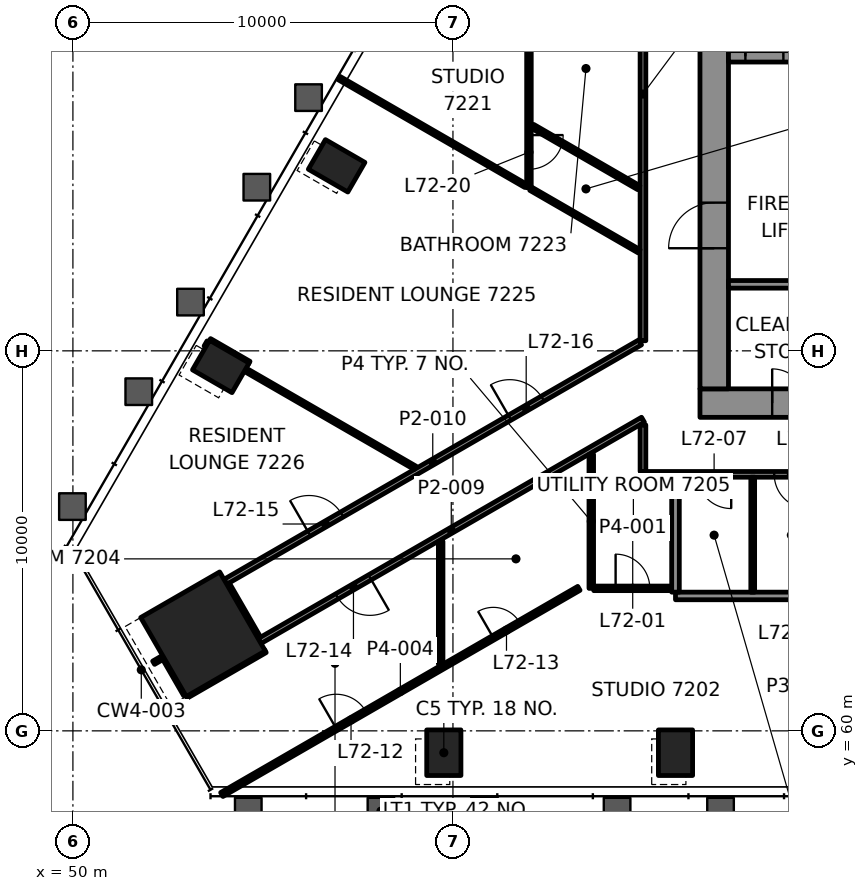
"""IFC4 building model, lengths in metres.
Left out: names, types, materials, properties, quantities, classifications, styles, units other than length and angle.
Written with IfcOpenShell. Run it as: python <this file> out.ifc"""

import sys

from ifc_helpers import new_model, si_unit, direction, frame, frame_2d, origin, origin_2d, place, context, subcontext, project, spatial, rectangle, hollow_rectangle, extrude, element, fill, save


model = new_model("IFC4")
c1 = context("Model", 3, precision=1e-05, world=origin(), true_north=direction((0.0, 1.0)))
c2 = subcontext(c1, "Body", "Model", "MODEL_VIEW")
j1 = project(units=[si_unit("LENGTHUNIT", "METRE"), si_unit("PLANEANGLEUNIT", "RADIAN")], contexts=[c1])
p1 = place(None, origin())
s1 = spatial("IfcSite", under=j1, at=p1, CompositionType="ELEMENT")
p2 = place(p1, origin())
s2 = spatial("IfcBuilding", under=s1, at=p2, CompositionType="ELEMENT")
p3 = place(p2, frame((0.0, 0.0, 298.6)))
s3 = spatial("IfcBuildingStorey", under=s2, at=p3, CompositionType="ELEMENT", Elevation=298.6)
p4 = place(p3, frame((53.423, 62.542, 0.0), z_axis=(0.0, 0.0, 1.0), x_axis=(0.5, -0.866025403784, 0.0)))
e1 = element("IfcColumn", 1, at=p4, inside=s3, PredefinedType="COLUMN", context=c2, shape_type="SweptSolid", body=[
    extrude(rectangle(XDim=2.4, YDim=2.4, at=origin_2d()), origin(), (0.0, 0.0, 1.0), 3.5),
])
for number, where, z_axis, x_axis in (
    (2, (59.76, 59.425, -0.0), (0.0, 0.0, 1.0), (1.0, 0.0, 0.0)),
    (3, (65.856, 59.425, -0.0), (0.0, 0.0, 1.0), (1.0, 0.0, 0.0)),
    (4, (56.939, 74.869, -0.0), (0.0, 0.0, 1.0), (-0.5, -0.866, 0.0)),
    (5, (53.891, 69.589, -0.0), (0.0, 0.0, 1.0), (-0.5, -0.866, 0.0)),
):
    element("IfcColumn", number, at=place(p3, frame(where, z_axis=z_axis, x_axis=x_axis)), inside=s3, PredefinedType="COLUMN", context=c2, shape_type="SweptSolid", body=[
        extrude(hollow_rectangle(XDim=0.9, YDim=1.2, WallThickness=0.06, at=origin_2d()), origin(), (0.0, 0.0, 1.0), 3.5),
    ])
p5 = place(p3, frame((66.5, 68.625, 0.0), z_axis=(0.0, 0.0, 1.0), x_axis=(1.0, 0.0, 0.0)))
e6 = element("IfcWall", 6, at=p5, inside=s3, PredefinedType="SHEAR", context=c2, shape_type="SweptSolid", body=[
    extrude(rectangle(XDim=17.0, YDim=0.75, at=frame_2d((8.5, 0.0))), origin(), (0.0, 0.0, 1.0), 3.3),
])
p6 = place(p5, frame((1.9, 0.0, 0.0)))
e7 = element("IfcOpeningElement", 7, at=p6, cuts=e6, PredefinedType="OPENING", context=c2, shape_type="SweptSolid", body=[
    extrude(rectangle(XDim=0.9, YDim=2.1, at=frame_2d((0.45, 1.05))), frame((0.0, 0.385, 0.0), z_axis=(0.0, -1.0, 0.0), x_axis=(1.0, 0.0, 0.0)), (0.0, 0.0, 1.0), 0.77),
])
p7 = place(p3, frame((66.875, 69.0, 0.0), z_axis=(0.0, 0.0, 1.0), x_axis=(0.0, 1.0, 0.0)))
e8 = element("IfcWall", 8, at=p7, inside=s3, PredefinedType="SHEAR", context=c2, shape_type="SweptSolid", body=[
    extrude(rectangle(XDim=12.0, YDim=0.75, at=frame_2d((6.0, 0.0))), origin(), (0.0, 0.0, 1.0), 3.3),
])
p8 = place(p7, frame((3.7, 0.0, 0.0)))
e9 = element("IfcOpeningElement", 9, at=p8, cuts=e8, PredefinedType="OPENING", context=c2, shape_type="SweptSolid", body=[
    extrude(rectangle(XDim=1.2, YDim=2.1, at=frame_2d((0.6, 1.05))), frame((0.0, 0.385, 0.0), z_axis=(0.0, -1.0, 0.0), x_axis=(1.0, 0.0, 0.0)), (0.0, 0.0, 1.0), 0.77),
])
p9 = place(p3, frame((67.25, 77.75, 0.0), z_axis=(0.0, 0.0, 1.0), x_axis=(1.0, 0.0, 0.0)))
e10 = element("IfcWall", 10, at=p9, inside=s3, PredefinedType="SHEAR", context=c2, shape_type="SweptSolid", body=[
    extrude(rectangle(XDim=15.5, YDim=0.3, at=frame_2d((7.75, 0.0))), origin(), (0.0, 0.0, 1.0), 3.3),
])
p10 = place(p9, frame((0.445, 0.0, 0.0)))
e11 = element("IfcOpeningElement", 11, at=p10, cuts=e10, PredefinedType="OPENING", context=c2, shape_type="SweptSolid", body=[
    extrude(rectangle(XDim=1.0, YDim=2.1, at=frame_2d((0.5, 1.05))), frame((0.0, 0.16, 0.0), z_axis=(0.0, -1.0, 0.0), x_axis=(1.0, 0.0, 0.0)), (0.0, 0.0, 1.0), 0.32),
])
p11 = place(p3, frame((65.856, 63.55, 0.0), z_axis=(0.0, 0.0, 1.0), x_axis=(1.0, 0.0, 0.0)))
e12 = element("IfcWall", 12, at=p11, inside=s3, PredefinedType="PARTITIONING", context=c2, shape_type="SweptSolid", body=[
    extrude(rectangle(XDim=8.128, YDim=0.2, at=frame_2d((4.064, 0.0))), origin(), (0.0, 0.0, 1.0), 2.7),
])
p12 = place(p3, frame((63.704, 63.75, 0.0), z_axis=(0.0, 0.0, 1.0), x_axis=(1.0, 0.0, 0.0)))
e13 = element("IfcWall", 13, at=p12, inside=s3, PredefinedType="PARTITIONING", context=c2, shape_type="SweptSolid", body=[
    extrude(rectangle(XDim=2.052, YDim=0.12, at=frame_2d((1.026, 0.0))), origin(), (0.0, 0.0, 1.0), 2.7),
])
p13 = place(p12, frame((0.576, 0.0, 0.0)))
e14 = element("IfcOpeningElement", 14, at=p13, cuts=e13, PredefinedType="OPENING", context=c2, shape_type="SweptSolid", body=[
    extrude(rectangle(XDim=0.9, YDim=2.1, at=frame_2d((0.45, 1.05))), frame((0.0, 0.07, 0.0), z_axis=(0.0, -1.0, 0.0), x_axis=(1.0, 0.0, 0.0)), (0.0, 0.0, 1.0), 0.14),
])
p14 = place(p3, frame((85.0, 66.75, 0.0), z_axis=(0.0, 0.0, 1.0), x_axis=(-1.0, 0.0, 0.0)))
e15 = element("IfcWall", 15, at=p14, inside=s3, PredefinedType="PARTITIONING", context=c2, shape_type="SweptSolid", body=[
    extrude(rectangle(XDim=20.0, YDim=0.15, at=frame_2d((10.0, 0.0))), origin(), (0.0, 0.0, 1.0), 2.7),
])
p15 = place(p14, frame((5.486, 0.0, 0.0)))
e16 = element("IfcOpeningElement", 16, at=p15, cuts=e15, PredefinedType="OPENING", context=c2, shape_type="SweptSolid", body=[
    extrude(rectangle(XDim=0.9, YDim=2.1, at=frame_2d((0.45, 1.05))), frame((0.0, 0.085, 0.0), z_axis=(0.0, -1.0, 0.0), x_axis=(1.0, 0.0, 0.0)), (0.0, 0.0, 1.0), 0.17),
])
p16 = place(p14, frame((11.582, 0.0, 0.0)))
e17 = element("IfcOpeningElement", 17, at=p16, cuts=e15, PredefinedType="OPENING", context=c2, shape_type="SweptSolid", body=[
    extrude(rectangle(XDim=0.9, YDim=2.1, at=frame_2d((0.45, 1.05))), frame((0.0, 0.085, 0.0), z_axis=(0.0, -1.0, 0.0), x_axis=(1.0, 0.0, 0.0)), (0.0, 0.0, 1.0), 0.17),
])
p17 = place(p14, frame((13.614, 0.0, 0.0)))
e18 = element("IfcOpeningElement", 18, at=p17, cuts=e15, PredefinedType="OPENING", context=c2, shape_type="SweptSolid", body=[
    extrude(rectangle(XDim=0.9, YDim=2.1, at=frame_2d((0.45, 1.05))), frame((0.0, 0.085, 0.0), z_axis=(0.0, -1.0, 0.0), x_axis=(1.0, 0.0, 0.0)), (0.0, 0.0, 1.0), 0.17),
])
p18 = place(p14, frame((15.646, 0.0, 0.0)))
e19 = element("IfcOpeningElement", 19, at=p18, cuts=e15, PredefinedType="OPENING", context=c2, shape_type="SweptSolid", body=[
    extrude(rectangle(XDim=0.9, YDim=2.1, at=frame_2d((0.45, 1.05))), frame((0.0, 0.085, 0.0), z_axis=(0.0, -1.0, 0.0), x_axis=(1.0, 0.0, 0.0)), (0.0, 0.0, 1.0), 0.17),
])
p19 = place(p14, frame((17.678, 0.0, 0.0)))
e20 = element("IfcOpeningElement", 20, at=p19, cuts=e15, PredefinedType="OPENING", context=c2, shape_type="SweptSolid", body=[
    extrude(rectangle(XDim=0.9, YDim=2.1, at=frame_2d((0.45, 1.05))), frame((0.0, 0.085, 0.0), z_axis=(0.0, -1.0, 0.0), x_axis=(1.0, 0.0, 0.0)), (0.0, 0.0, 1.0), 0.17),
])
p20 = place(p3, frame((53.917, 58.325, 0.0), z_axis=(0.0, 0.0, 1.0), x_axis=(0.8660274679, 0.499996424829, 0.0)))
e21 = element("IfcWall", 21, at=p20, inside=s3, PredefinedType="PARTITIONING", context=c2, shape_type="SweptSolid", body=[
    extrude(rectangle(XDim=10.851, YDim=0.12, at=frame_2d((5.425, 0.0))), origin(), (0.0, 0.0, 1.0), 2.7),
])
p21 = place(p20, frame((3.477, 0.0, 0.0)))
e22 = element("IfcOpeningElement", 22, at=p21, cuts=e21, PredefinedType="OPENING", context=c2, shape_type="SweptSolid", body=[
    extrude(rectangle(XDim=0.9, YDim=2.1, at=frame_2d((0.45, 1.05))), frame((0.0, 0.07, 0.0), z_axis=(0.0, -1.0, 0.0), x_axis=(1.0, 0.0, 0.0)), (0.0, 0.0, 1.0), 0.14),
])
p22 = place(p20, frame((8.25, 0.0, 0.0)))
e23 = element("IfcOpeningElement", 23, at=p22, cuts=e21, PredefinedType="OPENING", context=c2, shape_type="SweptSolid", body=[
    extrude(rectangle(XDim=0.8, YDim=2.1, at=frame_2d((0.4, 1.05))), frame((0.0, 0.07, 0.0), z_axis=(0.0, -1.0, 0.0), x_axis=(1.0, 0.0, 0.0)), (0.0, 0.0, 1.0), 0.14),
])
p23 = place(p3, frame((52.984, 60.904, 0.0), z_axis=(0.0, 0.0, 1.0), x_axis=(0.866011011868, 0.500024926702, 0.0)))
e24 = element("IfcWall", 24, at=p23, inside=s3, PredefinedType="PARTITIONING", context=c2, shape_type="SweptSolid", body=[
    extrude(rectangle(XDim=2.399, YDim=0.1, at=frame_2d((1.199, 0.0))), origin(), (0.0, 0.0, 1.0), 2.7),
])
p24 = place(p3, frame((65.0, 68.187, 0.0), z_axis=(0.0, 0.0, 1.0), x_axis=(-0.866026430432, -0.49999822179, 0.0)))
e25 = element("IfcWall", 25, at=p24, inside=s3, PredefinedType="PARTITIONING", context=c2, shape_type="SweptSolid", body=[
    extrude(rectangle(XDim=11.648, YDim=0.15, at=frame_2d((5.824, 0.0))), origin(), (0.0, 0.0, 1.0), 2.547),
])
p25 = place(p24, frame((8.296, 0.0, 0.0)))
e26 = element("IfcOpeningElement", 26, at=p25, cuts=e25, PredefinedType="OPENING", context=c2, shape_type="SweptSolid", body=[
    extrude(rectangle(XDim=1.0, YDim=2.1, at=frame_2d((0.5, 1.05))), frame((0.0, 0.085, 0.0), z_axis=(0.0, -1.0, 0.0), x_axis=(1.0, 0.0, 0.0)), (0.0, 0.0, 1.0), 0.17),
])
p26 = place(p3, frame((52.124, 61.792, 0.0), z_axis=(0.0, 0.0, 1.0), x_axis=(0.866006330792, 0.500033033937, 0.0)))
e27 = element("IfcWall", 27, at=p26, inside=s3, PredefinedType="PARTITIONING", context=c2, shape_type="SweptSolid", body=[
    extrude(rectangle(XDim=0.25, YDim=0.1, at=frame_2d((0.125, 0.0))), origin(), (0.0, 0.0, 1.0), 2.7),
])
p27 = place(p3, frame((54.012, 63.922, 0.0), z_axis=(0.0, 0.0, 1.0), x_axis=(0.866028779199, 0.499994153564, 0.0)))
e28 = element("IfcWall", 28, at=p27, inside=s3, PredefinedType="PARTITIONING", context=c2, shape_type="SweptSolid", body=[
    extrude(rectangle(XDim=12.601, YDim=0.15, at=frame_2d((6.3, 0.0))), origin(), (0.0, 0.0, 1.0), 2.7),
])
p28 = place(p27, frame((2.542, 0.0, 0.0)))
e29 = element("IfcOpeningElement", 29, at=p28, cuts=e28, PredefinedType="OPENING", context=c2, shape_type="SweptSolid", body=[
    extrude(rectangle(XDim=1.0, YDim=2.1, at=frame_2d((0.5, 1.05))), frame((0.0, 0.085, 0.0), z_axis=(0.0, -1.0, 0.0), x_axis=(1.0, 0.0, 0.0)), (0.0, 0.0, 1.0), 0.17),
])
p29 = place(p27, frame((8.639, 0.0, 0.0)))
e30 = element("IfcOpeningElement", 30, at=p29, cuts=e28, PredefinedType="OPENING", context=c2, shape_type="SweptSolid", body=[
    extrude(rectangle(XDim=1.0, YDim=2.1, at=frame_2d((0.5, 1.05))), frame((0.0, 0.085, 0.0), z_axis=(0.0, -1.0, 0.0), x_axis=(1.0, 0.0, 0.0)), (0.0, 0.0, 1.0), 0.17),
])
p30 = place(p3, frame((53.495, 70.102, 0.0), z_axis=(0.0, 0.0, 1.0), x_axis=(0.499906209203, 0.866079547155, 0.0)))
e31 = element("IfcWall", 31, at=p30, inside=s3, PredefinedType="PARTITIONING", context=c2, shape_type="SweptSolid", body=[
    extrude(rectangle(XDim=0.153, YDim=0.1, at=frame_2d((0.077, 0.0))), origin(), (0.0, 0.0, 1.0), 2.7),
])
p31 = place(p3, frame((67.888, 63.65, 0.0), z_axis=(0.0, 0.0, 1.0), x_axis=(0.0, 1.0, 0.0)))
e32 = element("IfcWall", 32, at=p31, inside=s3, PredefinedType="PARTITIONING", context=c2, shape_type="SweptSolid", body=[
    extrude(rectangle(XDim=3.025, YDim=0.1, at=frame_2d((1.513, 0.0))), origin(), (0.0, 0.0, 1.0), 2.7),
])
p32 = place(p3, frame((65.856, 63.65, 0.0), z_axis=(0.0, 0.0, 1.0), x_axis=(0.0, 1.0, 0.0)))
e33 = element("IfcWall", 33, at=p32, inside=s3, PredefinedType="PARTITIONING", context=c2, shape_type="SweptSolid", body=[
    extrude(rectangle(XDim=3.025, YDim=0.2, at=frame_2d((1.513, 0.0))), origin(), (0.0, 0.0, 1.0), 2.7),
])
p33 = place(p3, frame((65.0, 66.825, 0.0), z_axis=(0.0, 0.0, 1.0), x_axis=(0.0, 1.0, 0.0)))
e34 = element("IfcWall", 34, at=p33, inside=s3, PredefinedType="PARTITIONING", context=c2, shape_type="SweptSolid", body=[
    extrude(rectangle(XDim=1.226, YDim=0.15, at=frame_2d((0.613, 0.0))), origin(), (0.0, 0.0, 1.0), 2.547),
])
p34 = place(p3, frame((65.0, 70.266, 0.0), z_axis=(0.0, 0.0, 1.0), x_axis=(0.0, 1.0, 0.0)))
e35 = element("IfcWall", 35, at=p34, inside=s3, PredefinedType="PARTITIONING", context=c2, shape_type="SweptSolid", body=[
    extrude(rectangle(XDim=12.984, YDim=0.15, at=frame_2d((6.492, 0.0))), origin(), (0.0, 0.0, 1.0), 2.7),
])
p35 = place(p3, frame((63.64, 63.75, 0.0), z_axis=(0.0, 0.0, 1.0), x_axis=(0.0, 1.0, 0.0)))
e36 = element("IfcWall", 36, at=p35, inside=s3, PredefinedType="PARTITIONING", context=c2, shape_type="SweptSolid", body=[
    extrude(rectangle(XDim=3.525, YDim=0.12, at=frame_2d((1.763, 0.0))), origin(), (0.0, 0.0, 1.0), 2.547),
])
p36 = place(p3, frame((62.0, 85.834, 0.0), z_axis=(0.0, 0.0, 1.0), x_axis=(0.0, -1.0, 0.0)))
e37 = element("IfcWall", 37, at=p36, inside=s3, PredefinedType="PARTITIONING", context=c2, shape_type="SweptSolid", body=[
    extrude(rectangle(XDim=11.541, YDim=0.12, at=frame_2d((5.771, 0.0))), origin(), (0.0, 0.0, 1.0), 2.688),
])
p37 = place(p36, frame((2.754, 0.0, 0.0)))
e38 = element("IfcOpeningElement", 38, at=p37, cuts=e37, PredefinedType="OPENING", context=c2, shape_type="SweptSolid", body=[
    extrude(rectangle(XDim=0.9, YDim=2.1, at=frame_2d((0.45, 1.05))), frame((0.0, 0.07, 0.0), z_axis=(0.0, -1.0, 0.0), x_axis=(1.0, 0.0, 0.0)), (0.0, 0.0, 1.0), 0.14),
])
p38 = place(p36, frame((7.139, 0.0, 0.0)))
e39 = element("IfcOpeningElement", 39, at=p38, cuts=e37, PredefinedType="OPENING", context=c2, shape_type="SweptSolid", body=[
    extrude(rectangle(XDim=0.8, YDim=2.1, at=frame_2d((0.4, 1.05))), frame((0.0, 0.07, 0.0), z_axis=(0.0, -1.0, 0.0), x_axis=(1.0, 0.0, 0.0)), (0.0, 0.0, 1.0), 0.14),
])
p39 = place(p36, frame((10.156, 0.0, 0.0)))
e40 = element("IfcOpeningElement", 40, at=p39, cuts=e37, PredefinedType="OPENING", context=c2, shape_type="SweptSolid", body=[
    extrude(rectangle(XDim=0.9, YDim=2.1, at=frame_2d((0.45, 1.05))), frame((0.0, 0.07, 0.0), z_axis=(0.0, -1.0, 0.0), x_axis=(1.0, 0.0, 0.0)), (0.0, 0.0, 1.0), 0.14),
])
p40 = place(p3, frame((59.677, 61.759, 0.0), z_axis=(0.0, 0.0, 1.0), x_axis=(0.0, 1.0, 0.0)))
e41 = element("IfcWall", 41, at=p40, inside=s3, PredefinedType="PARTITIONING", context=c2, shape_type="SweptSolid", body=[
    extrude(rectangle(XDim=3.228, YDim=0.12, at=frame_2d((1.614, 0.0))), origin(), (0.0, 0.0, 1.0), 2.7),
])
p41 = place(p3, frame((54.872, 62.433, 0.0), z_axis=(0.0, 0.0, 1.0), x_axis=(-0.499988108725, 0.866032269107, 0.0)))
e42 = element("IfcWall", 42, at=p41, inside=s3, PredefinedType="PARTITIONING", context=c2, shape_type="SweptSolid", body=[
    extrude(rectangle(XDim=1.644, YDim=0.15, at=frame_2d((0.822, 0.0))), origin(), (0.0, 0.0, 1.0), 2.547),
])
p42 = place(p3, frame((52.958, 60.947, 0.0), z_axis=(0.0, 0.0, 1.0), x_axis=(-0.499955427682, 0.866051136095, 0.0)))
e43 = element("IfcWall", 43, at=p42, inside=s3, PredefinedType="PARTITIONING", context=c2, shape_type="SweptSolid", body=[
    extrude(rectangle(XDim=1.149, YDim=0.1, at=frame_2d((0.574, 0.0))), origin(), (0.0, 0.0, 1.0), 2.7),
])
p43 = place(p3, frame((64.89, 74.293, 0.0), z_axis=(0.0, 0.0, 1.0), x_axis=(-0.866033195618, 0.499986503906, 0.0)))
e44 = element("IfcWall", 44, at=p43, inside=s3, PredefinedType="PARTITIONING", context=c2, shape_type="SweptSolid", body=[
    extrude(rectangle(XDim=3.228, YDim=0.12, at=frame_2d((1.614, 0.0))), origin(), (0.0, 0.0, 1.0), 2.7),
])
p44 = place(p3, frame((64.899, 72.62, 0.0), z_axis=(0.0, 0.0, 1.0), x_axis=(-0.866032610133, 0.499987518031, 0.0)))
e45 = element("IfcWall", 45, at=p44, inside=s3, PredefinedType="PARTITIONING", context=c2, shape_type="SweptSolid", body=[
    extrude(rectangle(XDim=3.295, YDim=0.1, at=frame_2d((1.648, 0.0))), origin(), (0.0, 0.0, 1.0), 2.7),
])
p45 = place(p3, frame((54.636, 69.679, 0.0), z_axis=(0.0, 0.0, 1.0), x_axis=(-0.865978732077, 0.500080829057, 0.0)))
e46 = element("IfcWall", 46, at=p45, inside=s3, PredefinedType="PARTITIONING", context=c2, shape_type="SweptSolid", body=[
    extrude(rectangle(XDim=1.199, YDim=0.1, at=frame_2d((0.6, 0.0))), origin(), (0.0, 0.0, 1.0), 2.7),
])
p46 = place(p3, frame((59.005, 66.921, 0.0), z_axis=(0.0, 0.0, 1.0), x_axis=(-0.866022552607, 0.500004938352, 0.0)))
e47 = element("IfcWall", 47, at=p46, inside=s3, PredefinedType="PARTITIONING", context=c2, shape_type="SweptSolid", body=[
    extrude(rectangle(XDim=5.162, YDim=0.1, at=frame_2d((2.581, 0.0))), origin(), (0.0, 0.0, 1.0), 2.7),
])
p47 = place(p3, frame((61.915, 74.343, 0.0), z_axis=(0.0, 0.0, 1.0), x_axis=(-0.866030760678, 0.499990721473, 0.0)))
e48 = element("IfcWall", 48, at=p47, inside=s3, PredefinedType="PARTITIONING", context=c2, shape_type="SweptSolid", body=[
    extrude(rectangle(XDim=5.672, YDim=0.1, at=frame_2d((2.836, 0.0))), origin(), (0.0, 0.0, 1.0), 2.688),
])
p48 = place(p3, frame((67.25, 71.75, 0.0), z_axis=(0.0, 0.0, 1.0), x_axis=(1.0, 0.0, 0.0)))
e49 = element("IfcWall", 49, at=p48, inside=s3, PredefinedType="PARTITIONING", context=c2, shape_type="SweptSolid", body=[
    extrude(rectangle(XDim=3.05, YDim=0.2, at=frame_2d((1.525, 0.0))), origin(), (0.0, 0.0, 1.0), 3.3),
])
p49 = place(p13, origin())
e50 = element("IfcDoor", 50, at=p49, inside=s3, OperationType="SINGLE_SWING_LEFT", PredefinedType="DOOR", context=c2, shape_type="SweptSolid", body=[
    extrude(rectangle(XDim=0.9, YDim=2.1, at=frame_2d((0.45, 1.05))), frame((0.0, 0.025, 0.0), z_axis=(0.0, -1.0, 0.0), x_axis=(1.0, 0.0, 0.0)), (0.0, 0.0, 1.0), 0.05),
])
fill(e14, e50)
p50 = place(p18, origin())
e51 = element("IfcDoor", 51, at=p50, inside=s3, OperationType="SINGLE_SWING_LEFT", PredefinedType="DOOR", context=c2, shape_type="SweptSolid", body=[
    extrude(rectangle(XDim=0.9, YDim=2.1, at=frame_2d((0.45, 1.05))), frame((0.0, 0.025, 0.0), z_axis=(0.0, -1.0, 0.0), x_axis=(1.0, 0.0, 0.0)), (0.0, 0.0, 1.0), 0.05),
])
fill(e19, e51)
p51 = place(p19, origin())
e52 = element("IfcDoor", 52, at=p51, inside=s3, OperationType="SINGLE_SWING_RIGHT", PredefinedType="DOOR", context=c2, shape_type="SweptSolid", body=[
    extrude(rectangle(XDim=0.9, YDim=2.1, at=frame_2d((0.45, 1.05))), frame((0.0, 0.025, 0.0), z_axis=(0.0, -1.0, 0.0), x_axis=(1.0, 0.0, 0.0)), (0.0, 0.0, 1.0), 0.05),
])
fill(e20, e52)
p52 = place(p21, origin())
e53 = element("IfcDoor", 53, at=p52, inside=s3, OperationType="SINGLE_SWING_RIGHT", PredefinedType="DOOR", context=c2, shape_type="SweptSolid", body=[
    extrude(rectangle(XDim=0.9, YDim=2.1, at=frame_2d((0.45, 1.05))), frame((0.0, 0.025, 0.0), z_axis=(0.0, -1.0, 0.0), x_axis=(1.0, 0.0, 0.0)), (0.0, 0.0, 1.0), 0.05),
])
fill(e22, e53)
p53 = place(p22, origin())
e54 = element("IfcDoor", 54, at=p53, inside=s3, OperationType="SINGLE_SWING_RIGHT", PredefinedType="DOOR", context=c2, shape_type="SweptSolid", body=[
    extrude(rectangle(XDim=0.8, YDim=2.1, at=frame_2d((0.4, 1.05))), frame((0.0, 0.025, 0.0), z_axis=(0.0, -1.0, 0.0), x_axis=(1.0, 0.0, 0.0)), (0.0, 0.0, 1.0), 0.05),
])
fill(e23, e54)
p54 = place(p25, origin())
e55 = element("IfcDoor", 55, at=p54, inside=s3, OperationType="SINGLE_SWING_RIGHT", PredefinedType="DOOR", context=c2, shape_type="SweptSolid", body=[
    extrude(rectangle(XDim=1.0, YDim=2.1, at=frame_2d((0.5, 1.05))), frame((0.0, 0.025, 0.0), z_axis=(0.0, -1.0, 0.0), x_axis=(1.0, 0.0, 0.0)), (0.0, 0.0, 1.0), 0.05),
])
fill(e26, e55)
p55 = place(p28, origin())
e56 = element("IfcDoor", 56, at=p55, inside=s3, OperationType="SINGLE_SWING_LEFT", PredefinedType="DOOR", context=c2, shape_type="SweptSolid", body=[
    extrude(rectangle(XDim=1.0, YDim=2.1, at=frame_2d((0.5, 1.05))), frame((0.0, 0.025, 0.0), z_axis=(0.0, -1.0, 0.0), x_axis=(1.0, 0.0, 0.0)), (0.0, 0.0, 1.0), 0.05),
])
fill(e29, e56)
p56 = place(p29, origin())
e57 = element("IfcDoor", 57, at=p56, inside=s3, OperationType="SINGLE_SWING_RIGHT", PredefinedType="DOOR", context=c2, shape_type="SweptSolid", body=[
    extrude(rectangle(XDim=1.0, YDim=2.1, at=frame_2d((0.5, 1.05))), frame((0.0, 0.025, 0.0), z_axis=(0.0, -1.0, 0.0), x_axis=(1.0, 0.0, 0.0)), (0.0, 0.0, 1.0), 0.05),
])
fill(e30, e57)
p57 = place(p39, origin())
e58 = element("IfcDoor", 58, at=p57, inside=s3, OperationType="SINGLE_SWING_LEFT", PredefinedType="DOOR", context=c2, shape_type="SweptSolid", body=[
    extrude(rectangle(XDim=0.9, YDim=2.1, at=frame_2d((0.45, 1.05))), frame((0.0, 0.025, 0.0), z_axis=(0.0, -1.0, 0.0), x_axis=(1.0, 0.0, 0.0)), (0.0, 0.0, 1.0), 0.05),
])
fill(e40, e58)
p58 = place(p10, origin())
e59 = element("IfcDoor", 59, at=p58, inside=s3, OperationType="SINGLE_SWING_LEFT", PredefinedType="DOOR", context=c2, shape_type="SweptSolid", body=[
    extrude(rectangle(XDim=1.0, YDim=2.1, at=frame_2d((0.5, 1.05))), frame((0.0, 0.025, 0.0), z_axis=(0.0, -1.0, 0.0), x_axis=(1.0, 0.0, 0.0)), (0.0, 0.0, 1.0), 0.05),
])
fill(e11, e59)
p59 = place(p8, origin())
e60 = element("IfcDoor", 60, at=p59, inside=s3, OperationType="SINGLE_SWING_RIGHT", PredefinedType="DOOR", context=c2, shape_type="SweptSolid", body=[
    extrude(rectangle(XDim=1.2, YDim=2.1, at=frame_2d((0.6, 1.05))), frame((0.0, 0.095, 0.0), z_axis=(0.0, -1.0, 0.0), x_axis=(1.0, 0.0, 0.0)), (0.0, 0.0, 1.0), 0.19),
])
fill(e9, e60)
p60 = place(p6, origin())
e61 = element("IfcDoor", 61, at=p60, inside=s3, OperationType="SINGLE_SWING_RIGHT", PredefinedType="DOOR", context=c2, shape_type="SweptSolid", body=[
    extrude(rectangle(XDim=0.9, YDim=2.1, at=frame_2d((0.45, 1.05))), frame((0.0, 0.095, 0.0), z_axis=(0.0, -1.0, 0.0), x_axis=(1.0, 0.0, 0.0)), (0.0, 0.0, 1.0), 0.19),
])
fill(e7, e61)
save(model, sys.argv[1])
